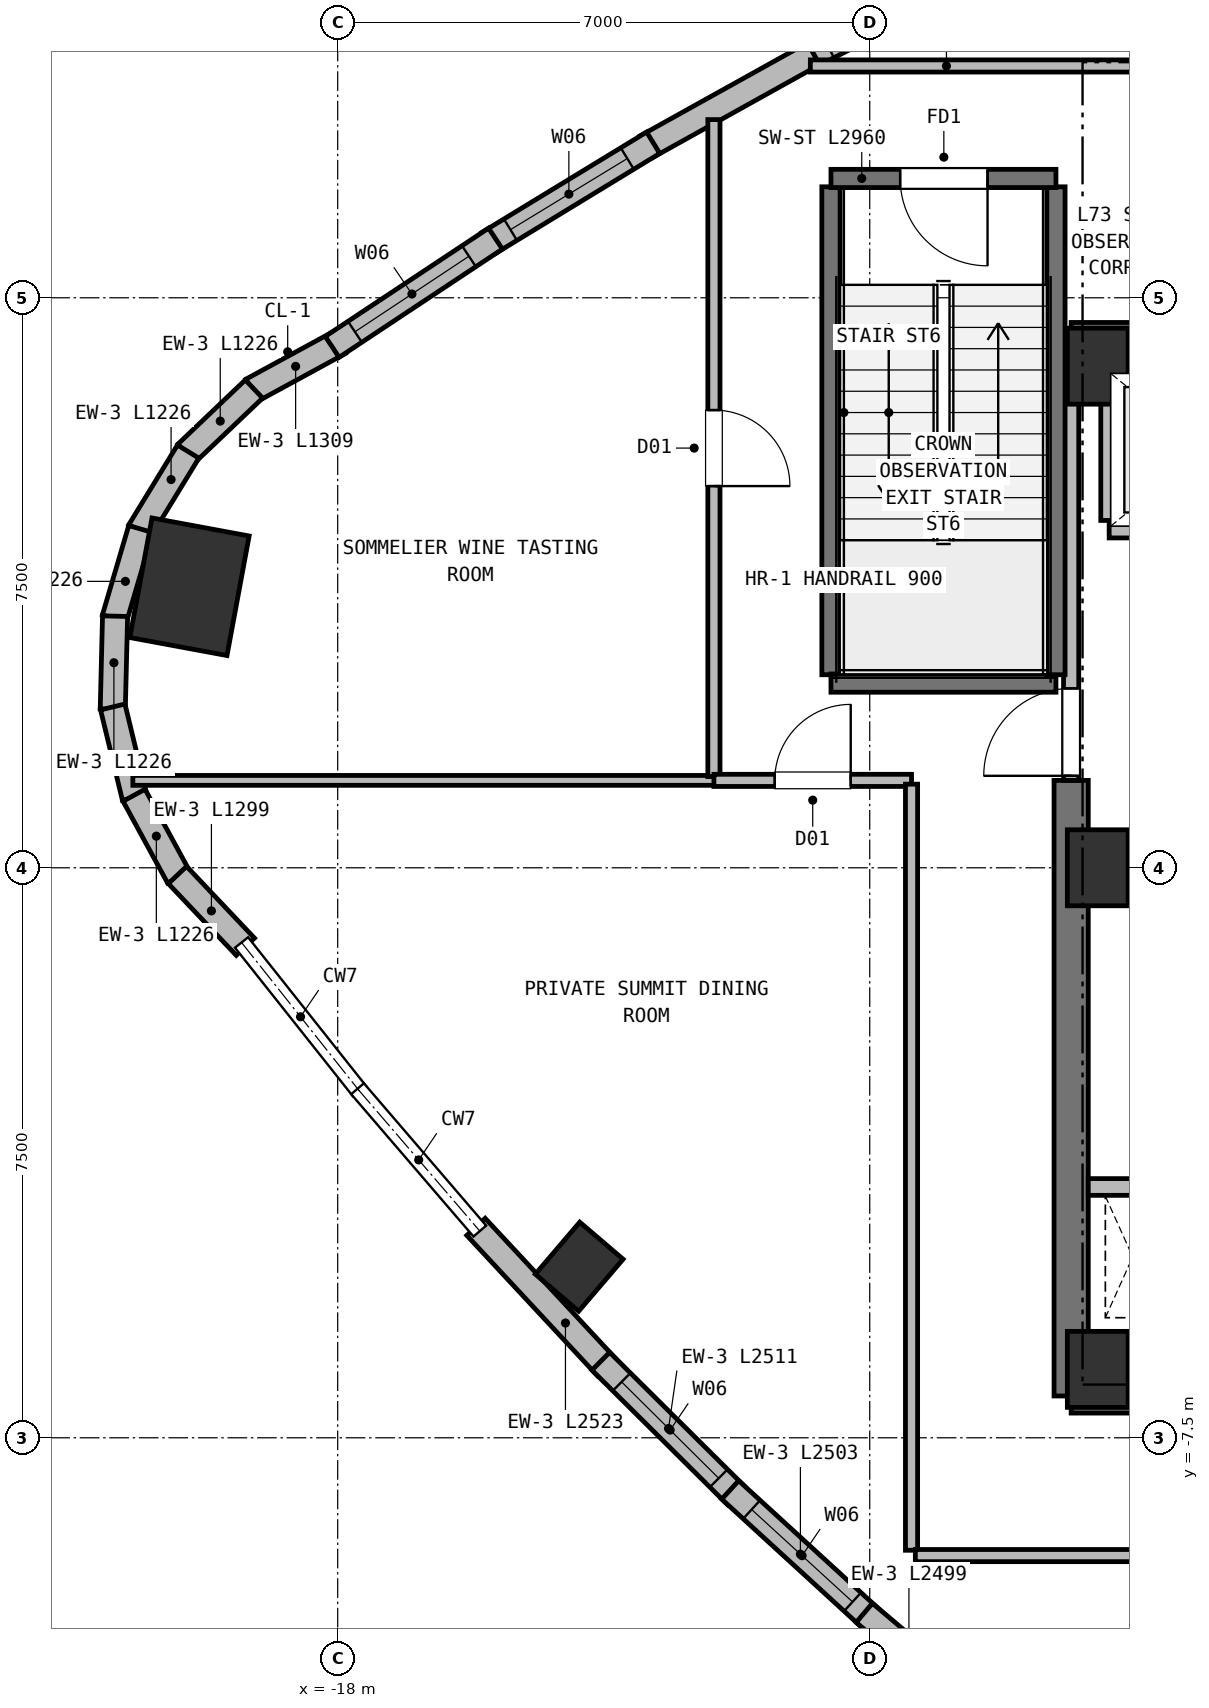
"""IFC4 building model, lengths in metres.
Left out: names, types, materials, properties, quantities, classifications, styles, units other than length and angle.
Written with IfcOpenShell. Run it as: python <this file> out.ifc"""

import sys

from ifc_helpers import new_model, si_unit, direction, frame, frame_2d, origin, origin_2d, place, context, subcontext, project, spatial, rectangle, extrude, element, fill, save


model = new_model("IFC4")
c1 = context("Model", 3, precision=1e-05, world=origin(), true_north=direction((0.0, 1.0)))
c2 = subcontext(c1, "Body", "Model", "MODEL_VIEW")
j1 = project(units=[si_unit("LENGTHUNIT", "METRE"), si_unit("PLANEANGLEUNIT", "RADIAN")], contexts=[c1])
p1 = place(None, origin())
s1 = spatial("IfcSite", under=j1, at=p1, CompositionType="ELEMENT")
p2 = place(p1, origin())
s2 = spatial("IfcBuilding", under=s1, at=p2, CompositionType="ELEMENT")
p3 = place(p2, frame((0.0, 0.0, 294.8)))
s3 = spatial("IfcBuildingStorey", under=s2, at=p3, CompositionType="ELEMENT", Elevation=294.8)
for number, where, z_axis, x_axis in (
    (1, (-8.0, -6.6, 0.0), (0.0, 0.0, 1.0), (1.0, 0.0, 0.0)),
    (2, (-8.0, 6.6, 0.0), (0.0, 0.0, 1.0), (1.0, 0.0, 0.0)),
    (3, (-8.0, 0.0, 0.0), (0.0, 0.0, 1.0), (1.0, 0.0, 0.0)),
):
    element("IfcColumn", number, at=place(p3, frame(where, z_axis=z_axis, x_axis=x_axis)), inside=s3, PredefinedType="COLUMN", context=c2, shape_type="SweptSolid", body=[
        extrude(rectangle(XDim=0.8, YDim=1.0, at=origin_2d()), origin(), (0.0, 0.0, 1.0), 4.4),
    ])
p4 = place(p3, frame((-8.35, 6.95, 0.0), z_axis=(0.0, 0.0, 1.0), x_axis=(1.0, 0.0, 0.0)))
e4 = element("IfcWall", 4, at=p4, inside=s3, PredefinedType="SHEAR", context=c2, shape_type="SweptSolid", body=[
    extrude(rectangle(XDim=16.7, YDim=0.45, at=frame_2d((8.35, 0.0))), origin(), (0.0, 0.0, 1.0), 4.13),
])
p5 = place(p3, frame((-8.35, -6.95, 0.0), z_axis=(0.0, 0.0, 1.0), x_axis=(1.0, 0.0, 0.0)))
e5 = element("IfcWall", 5, at=p5, inside=s3, PredefinedType="SHEAR", context=c2, shape_type="SweptSolid", body=[
    extrude(rectangle(XDim=3.95, YDim=0.45, at=frame_2d((1.975, 0.0))), origin(), (0.0, 0.0, 1.0), 4.13),
])
p6 = place(p3, frame((-8.35, -6.95, 0.0), z_axis=(0.0, 0.0, 1.0), x_axis=(0.0, 1.0, 0.0)))
e6 = element("IfcWall", 6, at=p6, inside=s3, PredefinedType="SHEAR", context=c2, shape_type="SweptSolid", body=[
    extrude(rectangle(XDim=8.1, YDim=0.45, at=frame_2d((4.05, 0.0))), origin(), (0.0, 0.0, 1.0), 4.13),
])
p7 = place(p3, frame((-19.95, 3.698, 0.0), z_axis=(0.0, 0.0, 1.0), x_axis=(-0.983254907564, 0.182235525492, 0.0)))
e7 = element("IfcColumn", 7, at=p7, inside=s3, PredefinedType="COLUMN", context=c2, shape_type="SweptSolid", body=[
    extrude(rectangle(XDim=1.3, YDim=1.6, at=origin_2d()), origin(), (0.0, 0.0, 1.0), 4.4),
])
p8 = place(p3, frame((-14.823, -5.249, 0.0), z_axis=(0.0, 0.0, 1.0), x_axis=(-0.7604059656, 0.64944804833, 0.0)))
e8 = element("IfcColumn", 8, at=p8, inside=s3, PredefinedType="COLUMN", context=c2, shape_type="SweptSolid", body=[
    extrude(rectangle(XDim=0.75, YDim=0.9, at=origin_2d()), origin(), (0.0, 0.0, 1.0), 4.4),
])
p9 = place(p3, frame((-19.128, 6.284, 0.0), z_axis=(0.0, 0.0, 1.0), x_axis=(0.878173375728, 0.478342473719, 0.0)))
e9 = element("IfcWall", 9, at=p9, inside=s3, PredefinedType="SOLIDWALL", context=c2, shape_type="SweptSolid", body=[
    extrude(rectangle(XDim=1.309, YDim=0.33, at=frame_2d((0.655, 0.0))), origin(), (0.0, 0.0, 1.0), 4.13),
])
for number, where, z_axis, x_axis in (
    (10, (-19.989, 5.454, 0.0), (0.0, 0.0, 1.0), (0.724, 0.69, 0.0)),
    (11, (-20.606, 4.43, 0.0), (0.0, 0.0, 1.0), (0.521, 0.853, 0.0)),
    (12, (-20.937, 3.281, 0.0), (0.0, 0.0, 1.0), (0.282, 0.959, 0.0)),
    (13, (-20.959, 2.085, 0.0), (0.0, 0.0, 1.0), (0.025, 1.0, 0.0)),
    (14, (-20.671, 0.924, 0.0), (0.0, 0.0, 1.0), (-0.235, 0.972, 0.0)),
):
    element("IfcWall", number, at=place(p3, frame(where, z_axis=z_axis, x_axis=x_axis)), inside=s3, PredefinedType="SOLIDWALL", context=c2, shape_type="SweptSolid", body=[
        extrude(rectangle(XDim=1.226, YDim=0.33, at=frame_2d((0.613, 0.0))), origin(), (0.0, 0.0, 1.0), 4.13),
    ])
p10 = place(p3, frame((-20.093, -0.122, 0.0), z_axis=(0.0, 0.0, 1.0), x_axis=(-0.478321862725, 0.878184602256, 0.0)))
e15 = element("IfcWall", 15, at=p10, inside=s3, PredefinedType="SOLIDWALL", context=c2, shape_type="SweptSolid", body=[
    extrude(rectangle(XDim=1.226, YDim=0.33, at=frame_2d((0.613, 0.0))), origin(), (0.0, 0.0, 1.0), 4.13),
])
p11 = place(p3, frame((-19.215, -1.039, 0.0), z_axis=(0.0, 0.0, 1.0), x_axis=(-0.687489239636, 0.726194564414, 0.0)))
e16 = element("IfcWall", 16, at=p11, inside=s3, PredefinedType="SOLIDWALL", context=c2, shape_type="SweptSolid", body=[
    extrude(rectangle(XDim=1.299, YDim=0.33, at=frame_2d((0.65, 0.0))), origin(), (0.0, 0.0, 1.0), 4.13),
])
p12 = place(p3, frame((-14.462, -6.572, 0.0), z_axis=(0.0, 0.0, 1.0), x_axis=(-0.681100323402, 0.732190104728, 0.0)))
e17 = element("IfcWall", 17, at=p12, inside=s3, PredefinedType="SOLIDWALL", context=c2, shape_type="SweptSolid", body=[
    extrude(rectangle(XDim=2.523, YDim=0.33, at=frame_2d((1.262, 0.0))), origin(), (0.0, 0.0, 1.0), 4.13),
])
p13 = place(p3, frame((-12.756, -8.262, 0.0), z_axis=(0.0, 0.0, 1.0), x_axis=(-0.709823779942, 0.704379302243, 0.0)))
e18 = element("IfcWall", 18, at=p13, inside=s3, PredefinedType="SOLIDWALL", context=c2, shape_type="SweptSolid", body=[
    extrude(rectangle(XDim=2.511, YDim=0.33, at=frame_2d((1.256, 0.0))), origin(), (0.0, 0.0, 1.0), 4.13),
])
p14 = place(p13, frame((0.326, 0.0, 0.72)))
e19 = element("IfcOpeningElement", 19, at=p14, cuts=e18, PredefinedType="OPENING", context=c2, shape_type="SweptSolid", body=[
    extrude(rectangle(XDim=1.8, YDim=2.25, at=frame_2d((0.9, 1.125))), frame((0.0, 0.175, 0.0), z_axis=(0.0, -1.0, 0.0), x_axis=(1.0, 0.0, 0.0)), (0.0, 0.0, 1.0), 0.35),
])
p15 = place(p3, frame((-10.989, -9.876, 0.0), z_axis=(0.0, 0.0, 1.0), x_axis=(-0.737627628948, 0.675207731748, 0.0)))
e20 = element("IfcWall", 20, at=p15, inside=s3, PredefinedType="SOLIDWALL", context=c2, shape_type="SweptSolid", body=[
    extrude(rectangle(XDim=2.503, YDim=0.33, at=frame_2d((1.251, 0.0))), origin(), (0.0, 0.0, 1.0), 4.13),
])
p16 = place(p15, frame((0.322, 0.0, 0.72)))
e21 = element("IfcOpeningElement", 21, at=p16, cuts=e20, PredefinedType="OPENING", context=c2, shape_type="SweptSolid", body=[
    extrude(rectangle(XDim=1.8, YDim=2.25, at=frame_2d((0.9, 1.125))), frame((0.0, 0.175, 0.0), z_axis=(0.0, -1.0, 0.0), x_axis=(1.0, 0.0, 0.0)), (0.0, 0.0, 1.0), 0.35),
])
p17 = place(p3, frame((-9.161, -11.415, 0.0), z_axis=(0.0, 0.0, 1.0), x_axis=(-0.764315556833, 0.644842406781, 0.0)))
e22 = element("IfcWall", 22, at=p17, inside=s3, PredefinedType="SOLIDWALL", context=c2, shape_type="SweptSolid", body=[
    extrude(rectangle(XDim=2.499, YDim=0.33, at=frame_2d((1.25, 0.0))), origin(), (0.0, 0.0, 1.0), 4.13),
])
p18 = place(p3, frame((-11.836, 10.659, 0.0), z_axis=(0.0, 0.0, 1.0), x_axis=(0.892552621867, 0.450943252747, 0.0)))
e23 = element("IfcWall", 23, at=p18, inside=s3, PredefinedType="SOLIDWALL", context=c2, shape_type="SweptSolid", body=[
    extrude(rectangle(XDim=2.511, YDim=0.33, at=frame_2d((1.255, 0.0))), origin(), (0.0, 0.0, 1.0), 4.13),
])
p19 = place(p18, frame((0.325, 0.0, 0.72)))
e24 = element("IfcOpeningElement", 24, at=p19, cuts=e23, PredefinedType="OPENING", context=c2, shape_type="SweptSolid", body=[
    extrude(rectangle(XDim=1.8, YDim=2.25, at=frame_2d((0.9, 1.125))), frame((0.0, 0.175, 0.0), z_axis=(0.0, -1.0, 0.0), x_axis=(1.0, 0.0, 0.0)), (0.0, 0.0, 1.0), 0.35),
])
p20 = place(p3, frame((-13.944, 9.485, 0.0), z_axis=(0.0, 0.0, 1.0), x_axis=(0.873960918974, 0.485996205856, 0.0)))
e25 = element("IfcWall", 25, at=p20, inside=s3, PredefinedType="SOLIDWALL", context=c2, shape_type="SweptSolid", body=[
    extrude(rectangle(XDim=2.523, YDim=0.33, at=frame_2d((1.261, 0.0))), origin(), (0.0, 0.0, 1.0), 4.13),
])
p21 = place(p3, frame((-16.017, 8.219, 0.0), z_axis=(0.0, 0.0, 1.0), x_axis=(0.854010909552, 0.520255097395, 0.0)))
e26 = element("IfcWall", 26, at=p21, inside=s3, PredefinedType="SOLIDWALL", context=c2, shape_type="SweptSolid", body=[
    extrude(rectangle(XDim=2.538, YDim=0.33, at=frame_2d((1.269, 0.0))), origin(), (0.0, 0.0, 1.0), 4.13),
])
p22 = place(p21, frame((0.339, 0.0, 0.72)))
e27 = element("IfcOpeningElement", 27, at=p22, cuts=e26, PredefinedType="OPENING", context=c2, shape_type="SweptSolid", body=[
    extrude(rectangle(XDim=1.8, YDim=2.25, at=frame_2d((0.9, 1.125))), frame((0.0, 0.175, 0.0), z_axis=(0.0, -1.0, 0.0), x_axis=(1.0, 0.0, 0.0)), (0.0, 0.0, 1.0), 0.35),
])
p23 = place(p3, frame((-18.073, 6.854, 0.0), z_axis=(0.0, 0.0, 1.0), x_axis=(0.833460819708, 0.552578557322, 0.0)))
e28 = element("IfcWall", 28, at=p23, inside=s3, PredefinedType="SOLIDWALL", context=c2, shape_type="SweptSolid", body=[
    extrude(rectangle(XDim=2.578, YDim=0.33, at=frame_2d((1.289, 0.0))), origin(), (0.0, 0.0, 1.0), 4.13),
])
p24 = place(p23, frame((0.359, 0.0, 0.72)))
e29 = element("IfcOpeningElement", 29, at=p24, cuts=e28, PredefinedType="OPENING", context=c2, shape_type="SweptSolid", body=[
    extrude(rectangle(XDim=1.8, YDim=2.25, at=frame_2d((0.9, 1.125))), frame((0.0, 0.175, 0.0), z_axis=(0.0, -1.0, 0.0), x_axis=(1.0, 0.0, 0.0)), (0.0, 0.0, 1.0), 0.35),
])
p25 = place(p3, frame((-7.6, -6.27, 0.0), z_axis=(0.0, 0.0, 1.0), x_axis=(1.0, 0.0, 0.0)))
e30 = element("IfcWall", 30, at=p25, inside=s3, PredefinedType="SHEAR", context=c2, shape_type="SweptSolid", body=[
    extrude(rectangle(XDim=3.59, YDim=0.24, at=frame_2d((1.795, 0.0))), origin(), (0.0, 0.0, 1.0), 4.13),
])
p26 = place(p3, frame((-8.125, -4.2, 0.0), z_axis=(0.0, 0.0, 1.0), x_axis=(1.0, 0.0, 0.0)))
e31 = element("IfcWall", 31, at=p26, inside=s3, PredefinedType="PARTITIONING", context=c2, shape_type="SweptSolid", body=[
    extrude(rectangle(XDim=1.035, YDim=0.22, at=frame_2d((0.518, 0.0))), origin(), (0.0, 0.0, 1.0), 4.13),
])
p27 = place(p3, frame((-7.85, 4.45, 0.0), z_axis=(0.0, 0.0, 1.0), x_axis=(1.0, 0.0, 0.0)))
e32 = element("IfcWall", 32, at=p27, inside=s3, PredefinedType="PARTITIONING", context=c2, shape_type="SweptSolid", body=[
    extrude(rectangle(XDim=2.5, YDim=0.22, at=frame_2d((1.25, 0.0))), origin(), (0.0, 0.0, 1.0), 4.13),
])
p28 = place(p27, frame((0.66, 0.0, 0.0)))
e33 = element("IfcOpeningElement", 33, at=p28, cuts=e32, PredefinedType="OPENING", context=c2, shape_type="SweptSolid", body=[
    extrude(rectangle(XDim=1.18, YDim=2.15, at=frame_2d((0.59, 1.075))), frame((0.0, 0.12, 0.0), z_axis=(0.0, -1.0, 0.0), x_axis=(1.0, 0.0, 0.0)), (0.0, 0.0, 1.0), 0.24),
])
p29 = place(p3, frame((-7.85, 4.57, 0.0), z_axis=(0.0, 0.0, 1.0), x_axis=(0.0, 1.0, 0.0)))
e34 = element("IfcWall", 34, at=p29, inside=s3, PredefinedType="PARTITIONING", context=c2, shape_type="SweptSolid", body=[
    extrude(rectangle(XDim=2.155, YDim=0.22, at=frame_2d((1.078, 0.0))), origin(), (0.0, 0.0, 1.0), 3.81),
])
p30 = place(p3, frame((-8.35, 1.15, 0.0), z_axis=(0.0, 0.0, 1.0), x_axis=(0.0, 1.0, 0.0)))
e35 = element("IfcWall", 35, at=p30, inside=s3, PredefinedType="PARTITIONING", context=c2, shape_type="SweptSolid", body=[
    extrude(rectangle(XDim=5.4, YDim=0.2, at=frame_2d((2.7, 0.0))), origin(), (0.0, 0.0, 1.0), 4.13),
])
p31 = place(p30, frame((0.06, 0.0, 0.0)))
e36 = element("IfcOpeningElement", 36, at=p31, cuts=e35, PredefinedType="OPENING", context=c2, shape_type="SweptSolid", body=[
    extrude(rectangle(XDim=1.15, YDim=2.15, at=frame_2d((0.575, 1.075))), frame((0.0, 0.11, 0.0), z_axis=(0.0, -1.0, 0.0), x_axis=(1.0, 0.0, 0.0)), (0.0, 0.0, 1.0), 0.22),
])
p32 = place(p3, frame((-11.51, 2.54, 0.0), z_axis=(0.0, 0.0, 1.0), x_axis=(0.0, 1.0, 0.0)))
e37 = element("IfcWall", 37, at=p32, inside=s3, PredefinedType="SHEAR", context=c2, shape_type="SweptSolid", body=[
    extrude(rectangle(XDim=6.42, YDim=0.24, at=frame_2d((3.21, 0.0))), origin(), (0.0, 0.0, 1.0), 4.13),
])
p33 = place(p3, frame((-11.51, 2.43, 0.0), z_axis=(0.0, 0.0, 1.0), x_axis=(1.0, 0.0, 0.0)))
e38 = element("IfcWall", 38, at=p33, inside=s3, PredefinedType="SHEAR", context=c2, shape_type="SweptSolid", body=[
    extrude(rectangle(XDim=2.96, YDim=0.24, at=frame_2d((1.48, 0.0))), origin(), (0.0, 0.0, 1.0), 4.13),
])
p34 = place(p3, frame((-8.55, 2.54, 0.0), z_axis=(0.0, 0.0, 1.0), x_axis=(0.0, 1.0, 0.0)))
e39 = element("IfcWall", 39, at=p34, inside=s3, PredefinedType="SHEAR", context=c2, shape_type="SweptSolid", body=[
    extrude(rectangle(XDim=6.42, YDim=0.24, at=frame_2d((3.21, 0.0))), origin(), (0.0, 0.0, 1.0), 4.13),
])
p35 = place(p3, frame((-8.55, 9.07, 0.0), z_axis=(0.0, 0.0, 1.0), x_axis=(-1.0, 0.0, 0.0)))
e40 = element("IfcWall", 40, at=p35, inside=s3, PredefinedType="SHEAR", context=c2, shape_type="SweptSolid", body=[
    extrude(rectangle(XDim=2.96, YDim=0.24, at=frame_2d((1.48, 0.0))), origin(), (0.0, 0.0, 1.0), 4.13),
])
p36 = place(p35, frame((0.9, 0.0, 0.0)))
e41 = element("IfcOpeningElement", 41, at=p36, cuts=e40, PredefinedType="OPENING", context=c2, shape_type="SweptSolid", body=[
    extrude(rectangle(XDim=1.15, YDim=2.15, at=frame_2d((0.575, 1.075))), frame((0.0, 0.13, 0.0), z_axis=(0.0, -1.0, 0.0), x_axis=(1.0, 0.0, 0.0)), (0.0, 0.0, 1.0), 0.26),
])
p37 = place(p3, frame((-20.695, 1.15, 0.0), z_axis=(0.0, 0.0, 1.0), x_axis=(1.0, 0.0, 0.0)))
e42 = element("IfcWall", 42, at=p37, inside=s3, PredefinedType="PARTITIONING", context=c2, shape_type="SweptSolid", body=[
    extrude(rectangle(XDim=7.695, YDim=0.13, at=frame_2d((3.847, 0.0))), origin(), (0.0, 0.0, 1.0), 4.13),
])
p38 = place(p3, frame((-7.12, 10.55, 0.0), z_axis=(0.0, 0.0, 1.0), x_axis=(-1.0, 0.0, 0.0)))
e43 = element("IfcWall", 43, at=p38, inside=s3, PredefinedType="PARTITIONING", context=c2, shape_type="SweptSolid", body=[
    extrude(rectangle(XDim=4.661, YDim=0.16, at=frame_2d((2.331, 0.0))), origin(), (0.0, 0.0, 1.0), 4.13),
])
p39 = place(p3, frame((-13.05, 9.844, 0.0), z_axis=(0.0, 0.0, 1.0), x_axis=(0.0, -1.0, 0.0)))
e44 = element("IfcWall", 44, at=p39, inside=s3, PredefinedType="PARTITIONING", context=c2, shape_type="SweptSolid", body=[
    extrude(rectangle(XDim=8.645, YDim=0.16, at=frame_2d((4.322, 0.0))), origin(), (0.0, 0.0, 1.0), 4.13),
])
p40 = place(p39, frame((3.822, 0.0, 0.0)))
e45 = element("IfcOpeningElement", 45, at=p40, cuts=e44, PredefinedType="OPENING", context=c2, shape_type="SweptSolid", body=[
    extrude(rectangle(XDim=1.0, YDim=2.15, at=frame_2d((0.5, 1.075))), frame((0.0, 0.09, 0.0), z_axis=(0.0, -1.0, 0.0), x_axis=(1.0, 0.0, 0.0)), (0.0, 0.0, 1.0), 0.18),
])
p41 = place(p3, frame((-13.05, 1.15, 0.0), z_axis=(0.0, 0.0, 1.0), x_axis=(1.0, 0.0, 0.0)))
e46 = element("IfcWall", 46, at=p41, inside=s3, PredefinedType="PARTITIONING", context=c2, shape_type="SweptSolid", body=[
    extrude(rectangle(XDim=2.6, YDim=0.16, at=frame_2d((1.3, 0.0))), origin(), (0.0, 0.0, 1.0), 3.71),
])
p42 = place(p41, frame((0.8, 0.0, 0.0)))
e47 = element("IfcOpeningElement", 47, at=p42, cuts=e46, PredefinedType="OPENING", context=c2, shape_type="SweptSolid", body=[
    extrude(rectangle(XDim=1.0, YDim=2.15, at=frame_2d((0.5, 1.075))), frame((0.0, 0.09, 0.0), z_axis=(0.0, -1.0, 0.0), x_axis=(1.0, 0.0, 0.0)), (0.0, 0.0, 1.0), 0.18),
])
p43 = place(p3, frame((-10.45, 1.1, 0.0), z_axis=(0.0, 0.0, 1.0), x_axis=(0.0, -1.0, 0.0)))
e48 = element("IfcWall", 48, at=p43, inside=s3, PredefinedType="PARTITIONING", context=c2, shape_type="SweptSolid", body=[
    extrude(rectangle(XDim=10.08, YDim=0.16, at=frame_2d((5.04, 0.0))), origin(), (0.0, 0.0, 1.0), 4.13),
])
p44 = place(p3, frame((-10.4, -9.05, 0.0), z_axis=(0.0, 0.0, 1.0), x_axis=(1.0, 0.0, 0.0)))
e49 = element("IfcWall", 49, at=p44, inside=s3, PredefinedType="PARTITIONING", context=c2, shape_type="SweptSolid", body=[
    extrude(rectangle(XDim=19.1, YDim=0.16, at=frame_2d((9.55, 0.0))), origin(), (0.0, 0.0, 1.0), 4.13),
])
p45 = place(p44, frame((6.03, 0.0, 0.0)))
e50 = element("IfcOpeningElement", 50, at=p45, cuts=e49, PredefinedType="OPENING", context=c2, shape_type="SweptSolid", body=[
    extrude(rectangle(XDim=1.0, YDim=2.15, at=frame_2d((0.5, 1.075))), frame((0.0, 0.09, 0.0), z_axis=(0.0, -1.0, 0.0), x_axis=(1.0, 0.0, 0.0)), (0.0, 0.0, 1.0), 0.18),
])
p46 = place(p44, frame((13.9, 0.0, 0.0)))
e51 = element("IfcOpeningElement", 51, at=p46, cuts=e49, PredefinedType="OPENING", context=c2, shape_type="SweptSolid", body=[
    extrude(rectangle(XDim=0.95, YDim=2.1, at=frame_2d((0.475, 1.05))), frame((0.0, 0.09, 0.0), z_axis=(0.0, -1.0, 0.0), x_axis=(1.0, 0.0, 0.0)), (0.0, 0.0, 1.0), 0.18),
])
p47 = place(p44, frame((16.92, 0.0, 0.0)))
e52 = element("IfcOpeningElement", 52, at=p47, cuts=e49, PredefinedType="OPENING", context=c2, shape_type="SweptSolid", body=[
    extrude(rectangle(XDim=0.95, YDim=2.1, at=frame_2d((0.475, 1.05))), frame((0.0, 0.09, 0.0), z_axis=(0.0, -1.0, 0.0), x_axis=(1.0, 0.0, 0.0)), (0.0, 0.0, 1.0), 0.18),
])
p48 = place(p14, origin())
e53 = element("IfcWindow", 53, at=p48, inside=s3, PartitioningType="SINGLE_PANEL", PredefinedType="WINDOW", context=c2, shape_type="SweptSolid", body=[
    extrude(rectangle(XDim=1.8, YDim=2.25, at=frame_2d((0.9, 1.125))), frame((0.0, 0.03, 0.0), z_axis=(0.0, -1.0, 0.0), x_axis=(1.0, 0.0, 0.0)), (0.0, 0.0, 1.0), 0.06),
])
fill(e19, e53)
p49 = place(p16, origin())
e54 = element("IfcWindow", 54, at=p49, inside=s3, PartitioningType="SINGLE_PANEL", PredefinedType="WINDOW", context=c2, shape_type="SweptSolid", body=[
    extrude(rectangle(XDim=1.8, YDim=2.25, at=frame_2d((0.9, 1.125))), frame((0.0, 0.03, 0.0), z_axis=(0.0, -1.0, 0.0), x_axis=(1.0, 0.0, 0.0)), (0.0, 0.0, 1.0), 0.06),
])
fill(e21, e54)
p50 = place(p22, origin())
e55 = element("IfcWindow", 55, at=p50, inside=s3, PartitioningType="SINGLE_PANEL", PredefinedType="WINDOW", context=c2, shape_type="SweptSolid", body=[
    extrude(rectangle(XDim=1.8, YDim=2.25, at=frame_2d((0.9, 1.125))), frame((0.0, 0.03, 0.0), z_axis=(0.0, -1.0, 0.0), x_axis=(1.0, 0.0, 0.0)), (0.0, 0.0, 1.0), 0.06),
])
fill(e27, e55)
p51 = place(p24, origin())
e56 = element("IfcWindow", 56, at=p51, inside=s3, PartitioningType="SINGLE_PANEL", PredefinedType="WINDOW", context=c2, shape_type="SweptSolid", body=[
    extrude(rectangle(XDim=1.8, YDim=2.25, at=frame_2d((0.9, 1.125))), frame((0.0, 0.03, 0.0), z_axis=(0.0, -1.0, 0.0), x_axis=(1.0, 0.0, 0.0)), (0.0, 0.0, 1.0), 0.06),
])
fill(e29, e56)
p52 = place(p31, origin())
e57 = element("IfcDoor", 57, at=p52, inside=s3, OperationType="SINGLE_SWING_LEFT", PredefinedType="DOOR", context=c2, shape_type="SweptSolid", body=[
    extrude(rectangle(XDim=1.15, YDim=2.15, at=frame_2d((0.575, 1.075))), frame((0.0, 0.025, 0.0), z_axis=(0.0, -1.0, 0.0), x_axis=(1.0, 0.0, 0.0)), (0.0, 0.0, 1.0), 0.05),
])
fill(e36, e57)
p53 = place(p36, origin())
e58 = element("IfcDoor", 58, at=p53, inside=s3, OperationType="SINGLE_SWING_LEFT", PredefinedType="DOOR", context=c2, shape_type="SweptSolid", body=[
    extrude(rectangle(XDim=1.15, YDim=2.15, at=frame_2d((0.575, 1.075))), frame((0.0, 0.025, 0.0), z_axis=(0.0, -1.0, 0.0), x_axis=(1.0, 0.0, 0.0)), (0.0, 0.0, 1.0), 0.05),
])
fill(e41, e58)
p54 = place(p42, origin())
e59 = element("IfcDoor", 59, at=p54, inside=s3, OperationType="SINGLE_SWING_RIGHT", PredefinedType="DOOR", context=c2, shape_type="SweptSolid", body=[
    extrude(rectangle(XDim=1.0, YDim=2.15, at=frame_2d((0.5, 1.075))), frame((0.0, 0.025, 0.0), z_axis=(0.0, -1.0, 0.0), x_axis=(1.0, 0.0, 0.0)), (0.0, 0.0, 1.0), 0.05),
])
fill(e47, e59)
p55 = place(p40, origin())
e60 = element("IfcDoor", 60, at=p55, inside=s3, OperationType="SINGLE_SWING_RIGHT", PredefinedType="DOOR", context=c2, shape_type="SweptSolid", body=[
    extrude(rectangle(XDim=1.0, YDim=2.15, at=frame_2d((0.5, 1.075))), frame((0.0, 0.025, 0.0), z_axis=(0.0, -1.0, 0.0), x_axis=(1.0, 0.0, 0.0)), (0.0, 0.0, 1.0), 0.05),
])
fill(e45, e60)
save(model, sys.argv[1])
